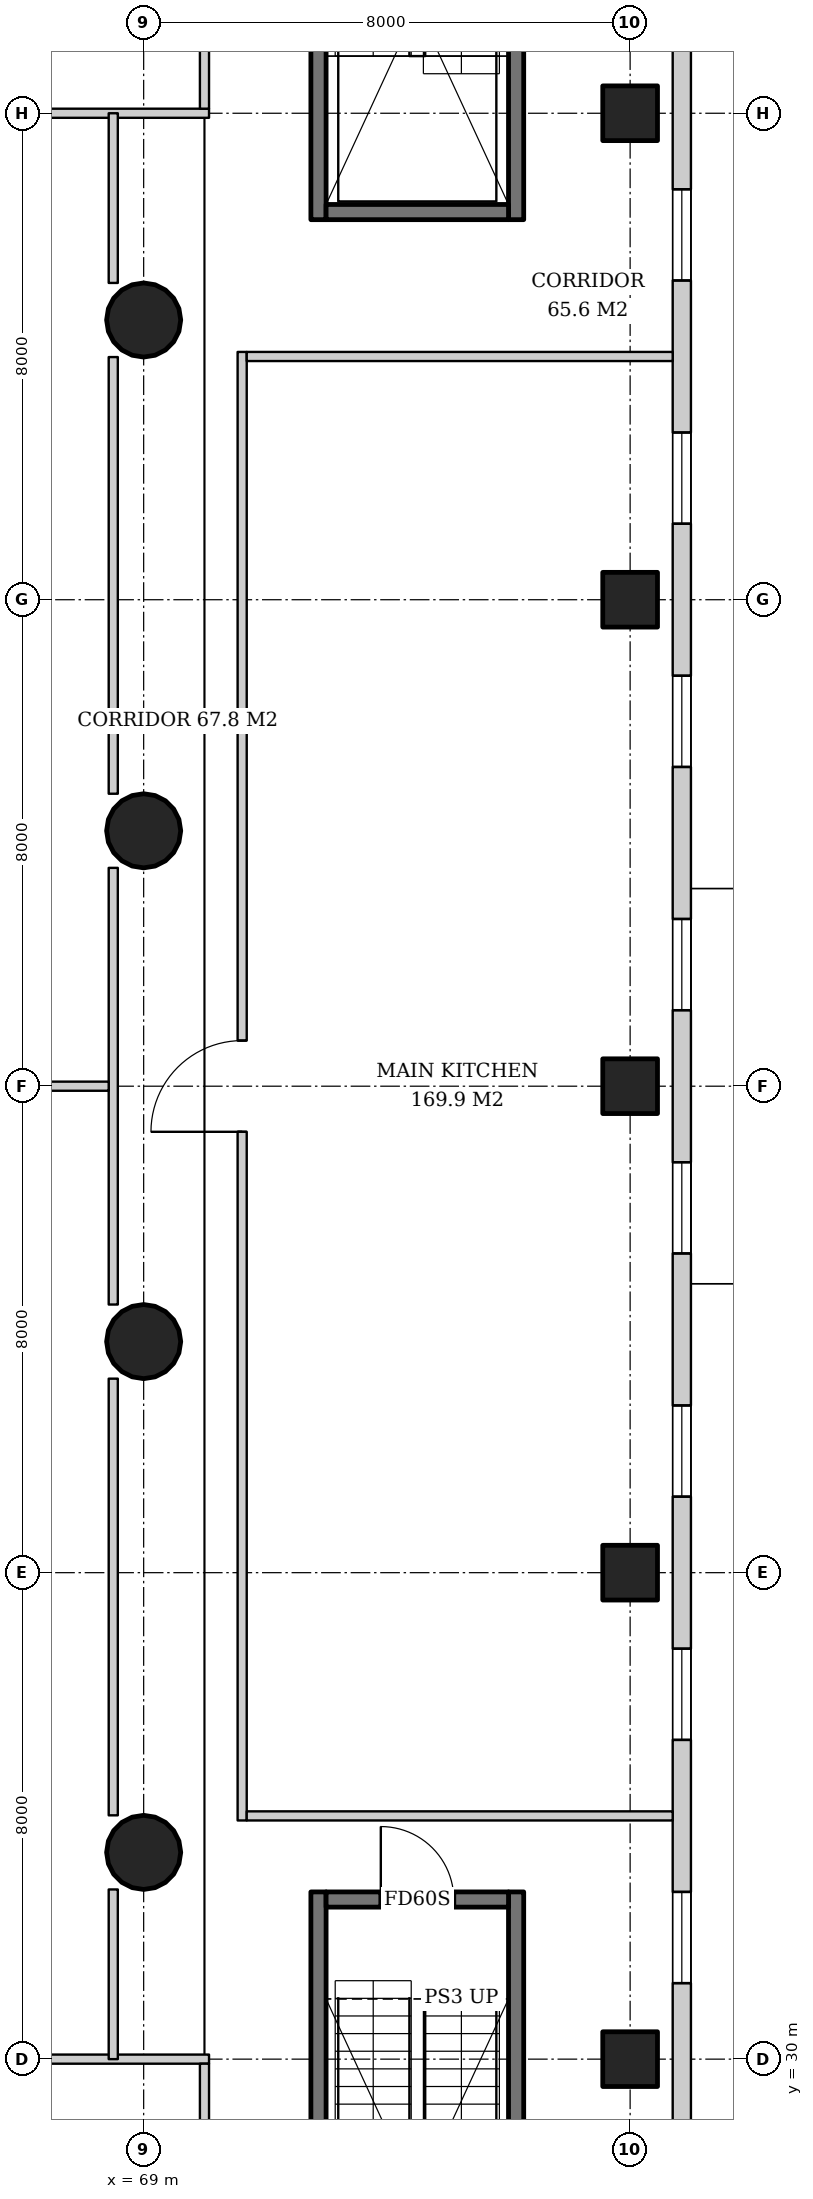
"""IFC4 building model, lengths in metres.
Left out: names, types, materials, properties, quantities, classifications, styles, units other than length and angle.
Written with IfcOpenShell. Run it as: python <this file> out.ifc"""

import sys

from ifc_helpers import new_model, si_unit, direction, frame, frame_2d, origin, origin_2d, place, context, subcontext, project, spatial, rectangle, hollow_circle, extrude, element, fill, save


model = new_model("IFC4")
c1 = context("Model", 3, precision=1e-05, world=origin(), true_north=direction((0.0, 1.0)))
c2 = subcontext(c1, "Body", "Model", "MODEL_VIEW")
j1 = project(units=[si_unit("LENGTHUNIT", "METRE"), si_unit("PLANEANGLEUNIT", "RADIAN")], contexts=[c1])
p1 = place(None, origin())
s1 = spatial("IfcSite", under=j1, at=p1, CompositionType="ELEMENT")
p2 = place(p1, origin())
s2 = spatial("IfcBuilding", under=s1, at=p2, CompositionType="ELEMENT")
p3 = place(p2, frame((0.0, 0.0, 16.0)))
s3 = spatial("IfcBuildingStorey", under=s2, at=p3, CompositionType="ELEMENT", Elevation=16.0)
for number, where, z_axis, x_axis in (
    (1, (77.0, 30.0, 0.0), (0.0, 0.0, 1.0), (1.0, 0.0, 0.0)),
    (2, (77.0, 38.0, 0.0), (0.0, 0.0, 1.0), (1.0, 0.0, 0.0)),
    (3, (77.0, 46.0, 0.0), (0.0, 0.0, 1.0), (1.0, 0.0, 0.0)),
    (4, (77.0, 54.0, 0.0), (0.0, 0.0, 1.0), (1.0, 0.0, 0.0)),
    (5, (77.0, 62.0, 0.0), (0.0, 0.0, 1.0), (1.0, 0.0, 0.0)),
):
    element("IfcColumn", number, at=place(p3, frame(where, z_axis=z_axis, x_axis=x_axis)), inside=s3, PredefinedType="COLUMN", context=c2, shape_type="SweptSolid", body=[
        extrude(rectangle(XDim=0.9, YDim=0.9, at=origin_2d()), origin(), (0.0, 0.0, 1.0), 5.0),
    ])
for number, where, z_axis, x_axis in (
    (6, (69.0, 33.4, 0.0), (0.0, 0.0, 1.0), (1.0, 0.0, 0.0)),
    (7, (69.0, 41.8, 0.0), (0.0, 0.0, 1.0), (1.0, 0.0, 0.0)),
    (8, (69.0, 50.2, 0.0), (0.0, 0.0, 1.0), (1.0, 0.0, 0.0)),
    (9, (69.0, 58.6, 0.0), (0.0, 0.0, 1.0), (1.0, 0.0, 0.0)),
):
    element("IfcColumn", number, at=place(p3, frame(where, z_axis=z_axis, x_axis=x_axis)), inside=s3, PredefinedType="COLUMN", context=c2, shape_type="SweptSolid", body=[
        extrude(hollow_circle(Radius=0.61, WallThickness=0.04, at=origin_2d()), origin(), (0.0, 0.0, 1.0), 5.0),
    ])
p4 = place(p3, frame((77.85, 21.3, 0.0), z_axis=(0.0, 0.0, 1.0), x_axis=(0.0, 1.0, 0.0)))
e10 = element("IfcWall", 10, at=p4, inside=s3, PredefinedType="SOLIDWALL", context=c2, shape_type="SweptSolid", body=[
    extrude(rectangle(XDim=49.4, YDim=0.3, at=frame_2d((24.7, 0.0))), origin(), (0.0, 0.0, 1.0), 4.7),
])
p5 = place(p4, frame((1.2, 0.0, 0.9)))
e11 = element("IfcOpeningElement", 11, at=p5, cuts=e10, PredefinedType="OPENING", context=c2, shape_type="SweptSolid", body=[
    extrude(rectangle(XDim=1.5, YDim=3.2, at=frame_2d((0.75, 1.6))), frame((0.0, 0.16, 0.0), z_axis=(0.0, -1.0, 0.0), x_axis=(1.0, 0.0, 0.0)), (0.0, 0.0, 1.0), 0.32),
])
p6 = place(p4, frame((5.7, 0.0, 0.9)))
e12 = element("IfcOpeningElement", 12, at=p6, cuts=e10, PredefinedType="OPENING", context=c2, shape_type="SweptSolid", body=[
    extrude(rectangle(XDim=1.5, YDim=3.2, at=frame_2d((0.75, 1.6))), frame((0.0, 0.16, 0.0), z_axis=(0.0, -1.0, 0.0), x_axis=(1.0, 0.0, 0.0)), (0.0, 0.0, 1.0), 0.32),
])
p7 = place(p4, frame((9.95, 0.0, 0.9)))
e13 = element("IfcOpeningElement", 13, at=p7, cuts=e10, PredefinedType="OPENING", context=c2, shape_type="SweptSolid", body=[
    extrude(rectangle(XDim=1.5, YDim=3.2, at=frame_2d((0.75, 1.6))), frame((0.0, 0.16, 0.0), z_axis=(0.0, -1.0, 0.0), x_axis=(1.0, 0.0, 0.0)), (0.0, 0.0, 1.0), 0.32),
])
p8 = place(p4, frame((13.95, 0.0, 0.9)))
e14 = element("IfcOpeningElement", 14, at=p8, cuts=e10, PredefinedType="OPENING", context=c2, shape_type="SweptSolid", body=[
    extrude(rectangle(XDim=1.5, YDim=3.2, at=frame_2d((0.75, 1.6))), frame((0.0, 0.16, 0.0), z_axis=(0.0, -1.0, 0.0), x_axis=(1.0, 0.0, 0.0)), (0.0, 0.0, 1.0), 0.32),
])
p9 = place(p4, frame((17.95, 0.0, 0.9)))
e15 = element("IfcOpeningElement", 15, at=p9, cuts=e10, PredefinedType="OPENING", context=c2, shape_type="SweptSolid", body=[
    extrude(rectangle(XDim=1.5, YDim=3.2, at=frame_2d((0.75, 1.6))), frame((0.0, 0.16, 0.0), z_axis=(0.0, -1.0, 0.0), x_axis=(1.0, 0.0, 0.0)), (0.0, 0.0, 1.0), 0.32),
])
p10 = place(p4, frame((21.95, 0.0, 0.9)))
e16 = element("IfcOpeningElement", 16, at=p10, cuts=e10, PredefinedType="OPENING", context=c2, shape_type="SweptSolid", body=[
    extrude(rectangle(XDim=1.5, YDim=3.2, at=frame_2d((0.75, 1.6))), frame((0.0, 0.16, 0.0), z_axis=(0.0, -1.0, 0.0), x_axis=(1.0, 0.0, 0.0)), (0.0, 0.0, 1.0), 0.32),
])
p11 = place(p4, frame((25.95, 0.0, 0.9)))
e17 = element("IfcOpeningElement", 17, at=p11, cuts=e10, PredefinedType="OPENING", context=c2, shape_type="SweptSolid", body=[
    extrude(rectangle(XDim=1.5, YDim=3.2, at=frame_2d((0.75, 1.6))), frame((0.0, 0.16, 0.0), z_axis=(0.0, -1.0, 0.0), x_axis=(1.0, 0.0, 0.0)), (0.0, 0.0, 1.0), 0.32),
])
p12 = place(p4, frame((29.95, 0.0, 0.9)))
e18 = element("IfcOpeningElement", 18, at=p12, cuts=e10, PredefinedType="OPENING", context=c2, shape_type="SweptSolid", body=[
    extrude(rectangle(XDim=1.5, YDim=3.2, at=frame_2d((0.75, 1.6))), frame((0.0, 0.16, 0.0), z_axis=(0.0, -1.0, 0.0), x_axis=(1.0, 0.0, 0.0)), (0.0, 0.0, 1.0), 0.32),
])
p13 = place(p4, frame((33.95, 0.0, 0.9)))
e19 = element("IfcOpeningElement", 19, at=p13, cuts=e10, PredefinedType="OPENING", context=c2, shape_type="SweptSolid", body=[
    extrude(rectangle(XDim=1.5, YDim=3.2, at=frame_2d((0.75, 1.6))), frame((0.0, 0.16, 0.0), z_axis=(0.0, -1.0, 0.0), x_axis=(1.0, 0.0, 0.0)), (0.0, 0.0, 1.0), 0.32),
])
p14 = place(p4, frame((37.95, 0.0, 0.9)))
e20 = element("IfcOpeningElement", 20, at=p14, cuts=e10, PredefinedType="OPENING", context=c2, shape_type="SweptSolid", body=[
    extrude(rectangle(XDim=1.5, YDim=3.2, at=frame_2d((0.75, 1.6))), frame((0.0, 0.16, 0.0), z_axis=(0.0, -1.0, 0.0), x_axis=(1.0, 0.0, 0.0)), (0.0, 0.0, 1.0), 0.32),
])
p15 = place(p4, frame((42.2, 0.0, 0.9)))
e21 = element("IfcOpeningElement", 21, at=p15, cuts=e10, PredefinedType="OPENING", context=c2, shape_type="SweptSolid", body=[
    extrude(rectangle(XDim=1.5, YDim=3.2, at=frame_2d((0.75, 1.6))), frame((0.0, 0.16, 0.0), z_axis=(0.0, -1.0, 0.0), x_axis=(1.0, 0.0, 0.0)), (0.0, 0.0, 1.0), 0.32),
])
p16 = place(p4, frame((46.7, 0.0, 0.9)))
e22 = element("IfcOpeningElement", 22, at=p16, cuts=e10, PredefinedType="OPENING", context=c2, shape_type="SweptSolid", body=[
    extrude(rectangle(XDim=1.5, YDim=3.2, at=frame_2d((0.75, 1.6))), frame((0.0, 0.16, 0.0), z_axis=(0.0, -1.0, 0.0), x_axis=(1.0, 0.0, 0.0)), (0.0, 0.0, 1.0), 0.32),
])
for number, where, z_axis, x_axis in (
    (23, (71.875, 24.25, 0.0), (0.0, 0.0, 1.0), (0.0, 1.0, 0.0)),
    (24, (75.125, 24.25, 0.0), (0.0, 0.0, 1.0), (0.0, 1.0, 0.0)),
):
    element("IfcWall", number, at=place(p3, frame(where, z_axis=z_axis, x_axis=x_axis)), inside=s3, PredefinedType="SOLIDWALL", context=c2, shape_type="SweptSolid", body=[
        extrude(rectangle(XDim=8.5, YDim=0.25, at=frame_2d((4.25, 0.0))), origin(), (0.0, 0.0, 1.0), 4.7),
    ])
p17 = place(p3, frame((72.0, 32.625, 0.0), z_axis=(0.0, 0.0, 1.0), x_axis=(1.0, 0.0, 0.0)))
e25 = element("IfcWall", 25, at=p17, inside=s3, PredefinedType="SOLIDWALL", context=c2, shape_type="SweptSolid", body=[
    extrude(rectangle(XDim=3.0, YDim=0.25, at=frame_2d((1.5, 0.0))), origin(), (0.0, 0.0, 1.0), 4.7),
])
p18 = place(p17, frame((0.9, 0.0, 0.0)))
e26 = element("IfcOpeningElement", 26, at=p18, cuts=e25, PredefinedType="OPENING", context=c2, shape_type="SweptSolid", body=[
    extrude(rectangle(XDim=1.2, YDim=2.1, at=frame_2d((0.6, 1.05))), frame((0.0, 0.135, 0.0), z_axis=(0.0, -1.0, 0.0), x_axis=(1.0, 0.0, 0.0)), (0.0, 0.0, 1.0), 0.27),
])
for number, where, z_axis, x_axis in (
    (27, (71.875, 60.25, 0.0), (0.0, 0.0, 1.0), (0.0, 1.0, 0.0)),
    (28, (75.125, 60.25, 0.0), (0.0, 0.0, 1.0), (0.0, 1.0, 0.0)),
):
    element("IfcWall", number, at=place(p3, frame(where, z_axis=z_axis, x_axis=x_axis)), inside=s3, PredefinedType="SOLIDWALL", context=c2, shape_type="SweptSolid", body=[
        extrude(rectangle(XDim=8.5, YDim=0.25, at=frame_2d((4.25, 0.0))), origin(), (0.0, 0.0, 1.0), 4.7),
    ])
p19 = place(p3, frame((72.0, 60.375, 0.0), z_axis=(0.0, 0.0, 1.0), x_axis=(1.0, 0.0, 0.0)))
e29 = element("IfcWall", 29, at=p19, inside=s3, PredefinedType="SOLIDWALL", context=c2, shape_type="SweptSolid", body=[
    extrude(rectangle(XDim=3.0, YDim=0.25, at=frame_2d((1.5, 0.0))), origin(), (0.0, 0.0, 1.0), 4.7),
])
p20 = place(p3, frame((70.62, 33.925, 0.0), z_axis=(0.0, 0.0, 1.0), x_axis=(0.0, 1.0, 0.0)))
e30 = element("IfcWall", 30, at=p20, inside=s3, PredefinedType="PARTITIONING", context=c2, shape_type="SweptSolid", body=[
    extrude(rectangle(XDim=24.15, YDim=0.15, at=frame_2d((12.075, 0.0))), origin(), (0.0, 0.0, 1.0), 4.7),
])
p21 = place(p20, frame((11.325, 0.0, 0.0)))
e31 = element("IfcOpeningElement", 31, at=p21, cuts=e30, PredefinedType="OPENING", context=c2, shape_type="SweptSolid", body=[
    extrude(rectangle(XDim=1.5, YDim=2.1, at=frame_2d((0.75, 1.05))), frame((0.0, 0.085, 0.0), z_axis=(0.0, -1.0, 0.0), x_axis=(1.0, 0.0, 0.0)), (0.0, 0.0, 1.0), 0.17),
])
for number, where, z_axis, x_axis in (
    (32, (70.695, 34.0, 0.0), (0.0, 0.0, 1.0), (1.0, 0.0, 0.0)),
    (33, (70.695, 58.0, 0.0), (0.0, 0.0, 1.0), (1.0, 0.0, 0.0)),
):
    element("IfcWall", number, at=place(p3, frame(where, z_axis=z_axis, x_axis=x_axis)), inside=s3, PredefinedType="PARTITIONING", context=c2, shape_type="SweptSolid", body=[
        extrude(rectangle(XDim=7.005, YDim=0.15, at=frame_2d((3.502, 0.0))), origin(), (0.0, 0.0, 1.0), 4.7),
    ])
p22 = place(p3, frame((19.925, 30.0, 0.0), z_axis=(0.0, 0.0, 1.0), x_axis=(1.0, 0.0, 0.0)))
e34 = element("IfcWall", 34, at=p22, inside=s3, PredefinedType="PARTITIONING", context=c2, shape_type="SweptSolid", body=[
    extrude(rectangle(XDim=50.15, YDim=0.15, at=frame_2d((25.075, 0.0))), origin(), (0.0, 0.0, 1.0), 3.688),
])
p23 = place(p22, frame((7.625, 0.0, 0.0)))
e35 = element("IfcOpeningElement", 35, at=p23, cuts=e34, PredefinedType="OPENING", context=c2, shape_type="SweptSolid", body=[
    extrude(rectangle(XDim=1.5, YDim=2.1, at=frame_2d((0.75, 1.05))), frame((0.0, 0.085, 0.0), z_axis=(0.0, -1.0, 0.0), x_axis=(1.0, 0.0, 0.0)), (0.0, 0.0, 1.0), 0.17),
])
p24 = place(p22, frame((20.375, 0.0, 0.0)))
e36 = element("IfcOpeningElement", 36, at=p24, cuts=e34, PredefinedType="OPENING", context=c2, shape_type="SweptSolid", body=[
    extrude(rectangle(XDim=1.0, YDim=2.1, at=frame_2d((0.5, 1.05))), frame((0.0, 0.085, 0.0), z_axis=(0.0, -1.0, 0.0), x_axis=(1.0, 0.0, 0.0)), (0.0, 0.0, 1.0), 0.17),
])
p25 = place(p22, frame((28.775, 0.0, 0.0)))
e37 = element("IfcOpeningElement", 37, at=p25, cuts=e34, PredefinedType="OPENING", context=c2, shape_type="SweptSolid", body=[
    extrude(rectangle(XDim=1.0, YDim=2.1, at=frame_2d((0.5, 1.05))), frame((0.0, 0.085, 0.0), z_axis=(0.0, -1.0, 0.0), x_axis=(1.0, 0.0, 0.0)), (0.0, 0.0, 1.0), 0.17),
])
p26 = place(p22, frame((39.875, 0.0, 0.0)))
e38 = element("IfcOpeningElement", 38, at=p26, cuts=e34, PredefinedType="OPENING", context=c2, shape_type="SweptSolid", body=[
    extrude(rectangle(XDim=1.0, YDim=2.1, at=frame_2d((0.5, 1.05))), frame((0.0, 0.085, 0.0), z_axis=(0.0, -1.0, 0.0), x_axis=(1.0, 0.0, 0.0)), (0.0, 0.0, 1.0), 0.17),
])
p27 = place(p3, frame((70.0, 21.075, 0.0), z_axis=(0.0, 0.0, 1.0), x_axis=(0.0, 1.0, 0.0)))
e39 = element("IfcWall", 39, at=p27, inside=s3, PredefinedType="PARTITIONING", context=c2, shape_type="SweptSolid", body=[
    extrude(rectangle(XDim=8.85, YDim=0.15, at=frame_2d((4.425, 0.0))), origin(), (0.0, 0.0, 1.0), 4.7),
])
p28 = place(p3, frame((19.925, 62.0, 0.0), z_axis=(0.0, 0.0, 1.0), x_axis=(1.0, 0.0, 0.0)))
e40 = element("IfcWall", 40, at=p28, inside=s3, PredefinedType="PARTITIONING", context=c2, shape_type="SweptSolid", body=[
    extrude(rectangle(XDim=50.15, YDim=0.15, at=frame_2d((25.075, 0.0))), origin(), (0.0, 0.0, 1.0), 3.688),
])
p29 = place(p28, frame((15.875, 0.0, 0.0)))
e41 = element("IfcOpeningElement", 41, at=p29, cuts=e40, PredefinedType="OPENING", context=c2, shape_type="SweptSolid", body=[
    extrude(rectangle(XDim=1.8, YDim=2.4, at=frame_2d((0.9, 1.2))), frame((0.0, 0.085, 0.0), z_axis=(0.0, -1.0, 0.0), x_axis=(1.0, 0.0, 0.0)), (0.0, 0.0, 1.0), 0.17),
])
p30 = place(p28, frame((39.875, 0.0, 0.0)))
e42 = element("IfcOpeningElement", 42, at=p30, cuts=e40, PredefinedType="OPENING", context=c2, shape_type="SweptSolid", body=[
    extrude(rectangle(XDim=1.0, YDim=2.1, at=frame_2d((0.5, 1.05))), frame((0.0, 0.085, 0.0), z_axis=(0.0, -1.0, 0.0), x_axis=(1.0, 0.0, 0.0)), (0.0, 0.0, 1.0), 0.17),
])
p31 = place(p3, frame((70.0, 62.075, 0.0), z_axis=(0.0, 0.0, 1.0), x_axis=(0.0, 1.0, 0.0)))
e43 = element("IfcWall", 43, at=p31, inside=s3, PredefinedType="PARTITIONING", context=c2, shape_type="SweptSolid", body=[
    extrude(rectangle(XDim=8.625, YDim=0.15, at=frame_2d((4.312, 0.0))), origin(), (0.0, 0.0, 1.0), 4.7),
])
p32 = place(p3, frame((68.5, 30.0, 0.0), z_axis=(0.0, 0.0, 1.0), x_axis=(0.0, 1.0, 0.0)))
e44 = element("IfcWall", 44, at=p32, inside=s3, PredefinedType="PARTITIONING", context=c2, shape_type="SweptSolid", body=[
    extrude(rectangle(XDim=2.791, YDim=0.15, at=frame_2d((1.395, 0.0))), origin(), (0.0, 0.0, 1.0), 4.7),
])
p33 = place(p3, frame((68.5, 34.01, 0.0), z_axis=(0.0, 0.0, 1.0), x_axis=(0.0, 1.0, 0.0)))
e45 = element("IfcWall", 45, at=p33, inside=s3, PredefinedType="PARTITIONING", context=c2, shape_type="SweptSolid", body=[
    extrude(rectangle(XDim=7.181, YDim=0.15, at=frame_2d((3.59, 0.0))), origin(), (0.0, 0.0, 1.0), 3.93),
])
p34 = place(p3, frame((68.5, 42.409, 0.0), z_axis=(0.0, 0.0, 1.0), x_axis=(0.0, 1.0, 0.0)))
e46 = element("IfcWall", 46, at=p34, inside=s3, PredefinedType="PARTITIONING", context=c2, shape_type="SweptSolid", body=[
    extrude(rectangle(XDim=7.181, YDim=0.15, at=frame_2d((3.591, 0.0))), origin(), (0.0, 0.0, 1.0), 3.93),
])
p35 = place(p3, frame((68.5, 50.81, 0.0), z_axis=(0.0, 0.0, 1.0), x_axis=(0.0, 1.0, 0.0)))
e47 = element("IfcWall", 47, at=p35, inside=s3, PredefinedType="PARTITIONING", context=c2, shape_type="SweptSolid", body=[
    extrude(rectangle(XDim=7.181, YDim=0.15, at=frame_2d((3.59, 0.0))), origin(), (0.0, 0.0, 1.0), 3.886),
])
p36 = place(p3, frame((68.5, 59.209, 0.0), z_axis=(0.0, 0.0, 1.0), x_axis=(0.0, 1.0, 0.0)))
e48 = element("IfcWall", 48, at=p36, inside=s3, PredefinedType="PARTITIONING", context=c2, shape_type="SweptSolid", body=[
    extrude(rectangle(XDim=2.791, YDim=0.15, at=frame_2d((1.395, 0.0))), origin(), (0.0, 0.0, 1.0), 3.886),
])
p37 = place(p3, frame((61.075, 46.0, 0.0), z_axis=(0.0, 0.0, 1.0), x_axis=(1.0, 0.0, 0.0)))
e49 = element("IfcWall", 49, at=p37, inside=s3, PredefinedType="PARTITIONING", context=c2, shape_type="SweptSolid", body=[
    extrude(rectangle(XDim=7.35, YDim=0.15, at=frame_2d((3.675, 0.0))), origin(), (0.0, 0.0, 1.0), 4.7),
])
p38 = place(p7, origin())
e50 = element("IfcWindow", 50, at=p38, inside=s3, PartitioningType="SINGLE_PANEL", PredefinedType="WINDOW", context=c2, shape_type="SweptSolid", body=[
    extrude(rectangle(XDim=1.5, YDim=3.2, at=frame_2d((0.75, 1.6))), frame((0.0, 0.03, 0.0), z_axis=(0.0, -1.0, 0.0), x_axis=(1.0, 0.0, 0.0)), (0.0, 0.0, 1.0), 0.06),
])
fill(e13, e50)
p39 = place(p8, origin())
e51 = element("IfcWindow", 51, at=p39, inside=s3, PartitioningType="SINGLE_PANEL", PredefinedType="WINDOW", context=c2, shape_type="SweptSolid", body=[
    extrude(rectangle(XDim=1.5, YDim=3.2, at=frame_2d((0.75, 1.6))), frame((0.0, 0.03, 0.0), z_axis=(0.0, -1.0, 0.0), x_axis=(1.0, 0.0, 0.0)), (0.0, 0.0, 1.0), 0.06),
])
fill(e14, e51)
p40 = place(p9, origin())
e52 = element("IfcWindow", 52, at=p40, inside=s3, PartitioningType="SINGLE_PANEL", PredefinedType="WINDOW", context=c2, shape_type="SweptSolid", body=[
    extrude(rectangle(XDim=1.5, YDim=3.2, at=frame_2d((0.75, 1.6))), frame((0.0, 0.03, 0.0), z_axis=(0.0, -1.0, 0.0), x_axis=(1.0, 0.0, 0.0)), (0.0, 0.0, 1.0), 0.06),
])
fill(e15, e52)
p41 = place(p10, origin())
e53 = element("IfcWindow", 53, at=p41, inside=s3, PartitioningType="SINGLE_PANEL", PredefinedType="WINDOW", context=c2, shape_type="SweptSolid", body=[
    extrude(rectangle(XDim=1.5, YDim=3.2, at=frame_2d((0.75, 1.6))), frame((0.0, 0.03, 0.0), z_axis=(0.0, -1.0, 0.0), x_axis=(1.0, 0.0, 0.0)), (0.0, 0.0, 1.0), 0.06),
])
fill(e16, e53)
p42 = place(p11, origin())
e54 = element("IfcWindow", 54, at=p42, inside=s3, PartitioningType="SINGLE_PANEL", PredefinedType="WINDOW", context=c2, shape_type="SweptSolid", body=[
    extrude(rectangle(XDim=1.5, YDim=3.2, at=frame_2d((0.75, 1.6))), frame((0.0, 0.03, 0.0), z_axis=(0.0, -1.0, 0.0), x_axis=(1.0, 0.0, 0.0)), (0.0, 0.0, 1.0), 0.06),
])
fill(e17, e54)
p43 = place(p12, origin())
e55 = element("IfcWindow", 55, at=p43, inside=s3, PartitioningType="SINGLE_PANEL", PredefinedType="WINDOW", context=c2, shape_type="SweptSolid", body=[
    extrude(rectangle(XDim=1.5, YDim=3.2, at=frame_2d((0.75, 1.6))), frame((0.0, 0.03, 0.0), z_axis=(0.0, -1.0, 0.0), x_axis=(1.0, 0.0, 0.0)), (0.0, 0.0, 1.0), 0.06),
])
fill(e18, e55)
p44 = place(p13, origin())
e56 = element("IfcWindow", 56, at=p44, inside=s3, PartitioningType="SINGLE_PANEL", PredefinedType="WINDOW", context=c2, shape_type="SweptSolid", body=[
    extrude(rectangle(XDim=1.5, YDim=3.2, at=frame_2d((0.75, 1.6))), frame((0.0, 0.03, 0.0), z_axis=(0.0, -1.0, 0.0), x_axis=(1.0, 0.0, 0.0)), (0.0, 0.0, 1.0), 0.06),
])
fill(e19, e56)
p45 = place(p14, origin())
e57 = element("IfcWindow", 57, at=p45, inside=s3, PartitioningType="SINGLE_PANEL", PredefinedType="WINDOW", context=c2, shape_type="SweptSolid", body=[
    extrude(rectangle(XDim=1.5, YDim=3.2, at=frame_2d((0.75, 1.6))), frame((0.0, 0.03, 0.0), z_axis=(0.0, -1.0, 0.0), x_axis=(1.0, 0.0, 0.0)), (0.0, 0.0, 1.0), 0.06),
])
fill(e20, e57)
p46 = place(p18, origin())
e58 = element("IfcDoor", 58, at=p46, inside=s3, OperationType="SINGLE_SWING_LEFT", PredefinedType="DOOR", context=c2, shape_type="SweptSolid", body=[
    extrude(rectangle(XDim=1.2, YDim=2.1, at=frame_2d((0.6, 1.05))), frame((0.0, 0.025, 0.0), z_axis=(0.0, -1.0, 0.0), x_axis=(1.0, 0.0, 0.0)), (0.0, 0.0, 1.0), 0.05),
])
fill(e26, e58)
p47 = place(p21, origin())
e59 = element("IfcDoor", 59, at=p47, inside=s3, OperationType="DOUBLE_DOOR_DOUBLE_SWING", PredefinedType="DOOR", context=c2, shape_type="SweptSolid", body=[
    extrude(rectangle(XDim=1.5, YDim=2.1, at=frame_2d((0.75, 1.05))), frame((0.0, 0.025, 0.0), z_axis=(0.0, -1.0, 0.0), x_axis=(1.0, 0.0, 0.0)), (0.0, 0.0, 1.0), 0.05),
])
fill(e31, e59)
save(model, sys.argv[1])
